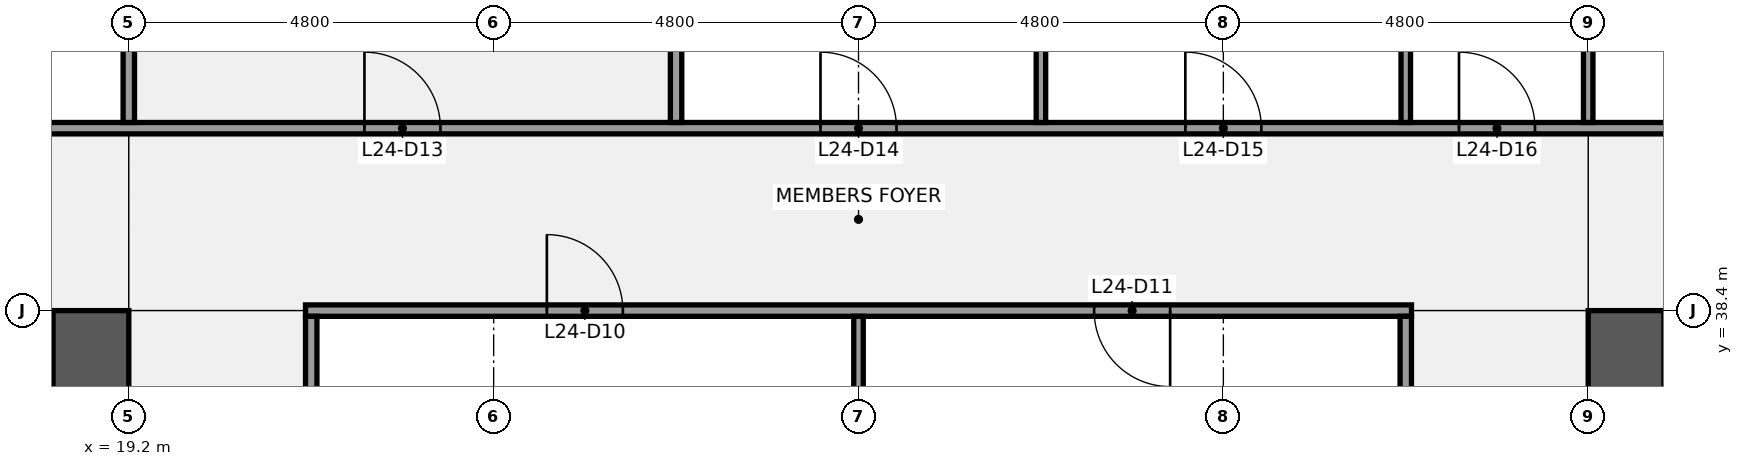
"""IFC4 building model, lengths in metres.
Left out: names, types, materials, properties, quantities, classifications, styles, units other than length and angle.
Written with IfcOpenShell. Run it as: python <this file> out.ifc"""

import sys

from ifc_helpers import new_model, si_unit, direction, frame, frame_2d, origin, place, context, subcontext, project, spatial, rectangle, extrude, element, fill, save


model = new_model("IFC4")
c1 = context("Model", 3, precision=1e-05, world=origin(), true_north=direction((0.0, 1.0)))
c2 = subcontext(c1, "Body", "Model", "MODEL_VIEW")
j1 = project(units=[si_unit("LENGTHUNIT", "METRE"), si_unit("PLANEANGLEUNIT", "RADIAN")], contexts=[c1])
p1 = place(None, origin())
s1 = spatial("IfcSite", under=j1, at=p1, CompositionType="ELEMENT")
p2 = place(p1, origin())
s2 = spatial("IfcBuilding", under=s1, at=p2, CompositionType="ELEMENT")
p3 = place(p2, frame((0.0, 0.0, 116.1)))
s3 = spatial("IfcBuildingStorey", under=s2, at=p3, CompositionType="ELEMENT", Elevation=116.1)
p4 = place(p3, frame((18.7, 38.4, 0.0), z_axis=(0.0, 0.0, 1.0), x_axis=(0.0, -1.0, 0.0)))
e1 = element("IfcWall", 1, at=p4, inside=s3, PredefinedType="SHEAR", context=c2, shape_type="SweptSolid", body=[
    extrude(rectangle(XDim=28.8, YDim=1.0, at=frame_2d((14.4, 0.0))), origin(), (0.0, 0.0, 1.0), 3.84),
])
p5 = place(p4, frame((18.3, 0.0, 0.0)))
e2 = element("IfcOpeningElement", 2, at=p5, cuts=e1, PredefinedType="OPENING", context=c2, shape_type="SweptSolid", body=[
    extrude(rectangle(XDim=1.8, YDim=2.1, at=frame_2d((0.9, 1.05))), frame((0.0, 0.51, 0.0), z_axis=(0.0, -1.0, 0.0), x_axis=(1.0, 0.0, 0.0)), (0.0, 0.0, 1.0), 1.02),
])
p6 = place(p4, frame((8.7, 0.0, 0.0)))
e3 = element("IfcOpeningElement", 3, at=p6, cuts=e1, PredefinedType="OPENING", context=c2, shape_type="SweptSolid", body=[
    extrude(rectangle(XDim=1.8, YDim=2.1, at=frame_2d((0.9, 1.05))), frame((0.0, 0.51, 0.0), z_axis=(0.0, -1.0, 0.0), x_axis=(1.0, 0.0, 0.0)), (0.0, 0.0, 1.0), 1.02),
])
p7 = place(p3, frame((38.9, 9.6, 0.0), z_axis=(0.0, 0.0, 1.0), x_axis=(0.0, 1.0, 0.0)))
e4 = element("IfcWall", 4, at=p7, inside=s3, PredefinedType="SHEAR", context=c2, shape_type="SweptSolid", body=[
    extrude(rectangle(XDim=28.8, YDim=1.0, at=frame_2d((14.4, 0.0))), origin(), (0.0, 0.0, 1.0), 3.84),
])
p8 = place(p7, frame((8.7, 0.0, 0.0)))
e5 = element("IfcOpeningElement", 5, at=p8, cuts=e4, PredefinedType="OPENING", context=c2, shape_type="SweptSolid", body=[
    extrude(rectangle(XDim=1.8, YDim=2.1, at=frame_2d((0.9, 1.05))), frame((0.0, 0.51, 0.0), z_axis=(0.0, -1.0, 0.0), x_axis=(1.0, 0.0, 0.0)), (0.0, 0.0, 1.0), 1.02),
])
p9 = place(p7, frame((18.3, 0.0, 0.0)))
e6 = element("IfcOpeningElement", 6, at=p9, cuts=e4, PredefinedType="OPENING", context=c2, shape_type="SweptSolid", body=[
    extrude(rectangle(XDim=1.8, YDim=2.1, at=frame_2d((0.9, 1.05))), frame((0.0, 0.51, 0.0), z_axis=(0.0, -1.0, 0.0), x_axis=(1.0, 0.0, 0.0)), (0.0, 0.0, 1.0), 1.02),
])
p10 = place(p3, frame((21.525, 38.4, 0.0), z_axis=(0.0, 0.0, 1.0), x_axis=(1.0, 0.0, 0.0)))
e7 = element("IfcWall", 7, at=p10, inside=s3, PredefinedType="PARTITIONING", context=c2, shape_type="SweptSolid", body=[
    extrude(rectangle(XDim=14.55, YDim=0.15, at=frame_2d((7.275, 0.0))), origin(), (0.0, 0.0, 1.0), 2.936),
])
p11 = place(p10, frame((3.175, 0.0, 0.0)))
e8 = element("IfcOpeningElement", 8, at=p11, cuts=e7, PredefinedType="OPENING", context=c2, shape_type="SweptSolid", body=[
    extrude(rectangle(XDim=1.0, YDim=2.1, at=frame_2d((0.5, 1.05))), frame((0.0, 0.085, 0.0), z_axis=(0.0, -1.0, 0.0), x_axis=(1.0, 0.0, 0.0)), (0.0, 0.0, 1.0), 0.17),
])
p12 = place(p10, frame((10.375, 0.0, 0.0)))
e9 = element("IfcOpeningElement", 9, at=p12, cuts=e7, PredefinedType="OPENING", context=c2, shape_type="SweptSolid", body=[
    extrude(rectangle(XDim=1.0, YDim=2.1, at=frame_2d((0.5, 1.05))), frame((0.0, 0.085, 0.0), z_axis=(0.0, -1.0, 0.0), x_axis=(1.0, 0.0, 0.0)), (0.0, 0.0, 1.0), 0.17),
])
p13 = place(p3, frame((14.325, 40.8, 0.0), z_axis=(0.0, 0.0, 1.0), x_axis=(1.0, 0.0, 0.0)))
e10 = element("IfcWall", 10, at=p13, inside=s3, PredefinedType="PARTITIONING", context=c2, shape_type="SweptSolid", body=[
    extrude(rectangle(XDim=28.95, YDim=0.15, at=frame_2d((14.475, 0.0))), origin(), (0.0, 0.0, 1.0), 2.936),
])
p14 = place(p13, frame((2.575, 0.0, 0.0)))
e11 = element("IfcOpeningElement", 11, at=p14, cuts=e10, PredefinedType="OPENING", context=c2, shape_type="SweptSolid", body=[
    extrude(rectangle(XDim=1.0, YDim=2.1, at=frame_2d((0.5, 1.05))), frame((0.0, 0.085, 0.0), z_axis=(0.0, -1.0, 0.0), x_axis=(1.0, 0.0, 0.0)), (0.0, 0.0, 1.0), 0.17),
])
p15 = place(p13, frame((7.975, 0.0, 0.0)))
e12 = element("IfcOpeningElement", 12, at=p15, cuts=e10, PredefinedType="OPENING", context=c2, shape_type="SweptSolid", body=[
    extrude(rectangle(XDim=1.0, YDim=2.1, at=frame_2d((0.5, 1.05))), frame((0.0, 0.085, 0.0), z_axis=(0.0, -1.0, 0.0), x_axis=(1.0, 0.0, 0.0)), (0.0, 0.0, 1.0), 0.17),
])
p16 = place(p13, frame((13.975, 0.0, 0.0)))
e13 = element("IfcOpeningElement", 13, at=p16, cuts=e10, PredefinedType="OPENING", context=c2, shape_type="SweptSolid", body=[
    extrude(rectangle(XDim=1.0, YDim=2.1, at=frame_2d((0.5, 1.05))), frame((0.0, 0.085, 0.0), z_axis=(0.0, -1.0, 0.0), x_axis=(1.0, 0.0, 0.0)), (0.0, 0.0, 1.0), 0.17),
])
p17 = place(p13, frame((18.775, 0.0, 0.0)))
e14 = element("IfcOpeningElement", 14, at=p17, cuts=e10, PredefinedType="OPENING", context=c2, shape_type="SweptSolid", body=[
    extrude(rectangle(XDim=1.0, YDim=2.1, at=frame_2d((0.5, 1.05))), frame((0.0, 0.085, 0.0), z_axis=(0.0, -1.0, 0.0), x_axis=(1.0, 0.0, 0.0)), (0.0, 0.0, 1.0), 0.17),
])
p18 = place(p13, frame((22.375, 0.0, 0.0)))
e15 = element("IfcOpeningElement", 15, at=p18, cuts=e10, PredefinedType="OPENING", context=c2, shape_type="SweptSolid", body=[
    extrude(rectangle(XDim=1.0, YDim=2.1, at=frame_2d((0.5, 1.05))), frame((0.0, 0.085, 0.0), z_axis=(0.0, -1.0, 0.0), x_axis=(1.0, 0.0, 0.0)), (0.0, 0.0, 1.0), 0.17),
])
p19 = place(p13, frame((25.975, 0.0, 0.0)))
e16 = element("IfcOpeningElement", 16, at=p19, cuts=e10, PredefinedType="OPENING", context=c2, shape_type="SweptSolid", body=[
    extrude(rectangle(XDim=1.0, YDim=2.1, at=frame_2d((0.5, 1.05))), frame((0.0, 0.085, 0.0), z_axis=(0.0, -1.0, 0.0), x_axis=(1.0, 0.0, 0.0)), (0.0, 0.0, 1.0), 0.17),
])
p20 = place(p3, frame((19.2, 40.875, 0.0), z_axis=(0.0, 0.0, 1.0), x_axis=(0.0, 1.0, 0.0)))
e17 = element("IfcWall", 17, at=p20, inside=s3, PredefinedType="PARTITIONING", context=c2, shape_type="SweptSolid", body=[
    extrude(rectangle(XDim=3.45, YDim=0.15, at=frame_2d((1.725, 0.0))), origin(), (0.0, 0.0, 1.0), 2.936),
])
p21 = place(p3, frame((21.6, 33.675, 0.0), z_axis=(0.0, 0.0, 1.0), x_axis=(0.0, 1.0, 0.0)))
e18 = element("IfcWall", 18, at=p21, inside=s3, PredefinedType="PARTITIONING", context=c2, shape_type="SweptSolid", body=[
    extrude(rectangle(XDim=4.65, YDim=0.15, at=frame_2d((2.325, 0.0))), origin(), (0.0, 0.0, 1.0), 2.936),
])
p22 = place(p3, frame((26.4, 40.875, 0.0), z_axis=(0.0, 0.0, 1.0), x_axis=(0.0, 1.0, 0.0)))
e19 = element("IfcWall", 19, at=p22, inside=s3, PredefinedType="PARTITIONING", context=c2, shape_type="SweptSolid", body=[
    extrude(rectangle(XDim=3.45, YDim=0.15, at=frame_2d((1.725, 0.0))), origin(), (0.0, 0.0, 1.0), 2.936),
])
p23 = place(p3, frame((28.8, 33.663, 0.0), z_axis=(0.0, 0.0, 1.0), x_axis=(0.0, 1.0, 0.0)))
e20 = element("IfcWall", 20, at=p23, inside=s3, PredefinedType="PARTITIONING", context=c2, shape_type="SweptSolid", body=[
    extrude(rectangle(XDim=4.662, YDim=0.125, at=frame_2d((2.331, 0.0))), origin(), (0.0, 0.0, 1.0), 2.936),
])
for number, where, z_axis, x_axis in (
    (21, (31.2, 40.875, 0.0), (0.0, 0.0, 1.0), (0.0, 1.0, 0.0)),
    (22, (36.0, 40.875, 0.0), (0.0, 0.0, 1.0), (0.0, 1.0, 0.0)),
):
    element("IfcWall", number, at=place(p3, frame(where, z_axis=z_axis, x_axis=x_axis)), inside=s3, PredefinedType="PARTITIONING", context=c2, shape_type="SweptSolid", body=[
        extrude(rectangle(XDim=7.025, YDim=0.125, at=frame_2d((3.512, 0.0))), origin(), (0.0, 0.0, 1.0), 2.936),
    ])
p24 = place(p3, frame((36.0, 33.675, 0.0), z_axis=(0.0, 0.0, 1.0), x_axis=(0.0, 1.0, 0.0)))
e23 = element("IfcWall", 23, at=p24, inside=s3, PredefinedType="PARTITIONING", context=c2, shape_type="SweptSolid", body=[
    extrude(rectangle(XDim=4.65, YDim=0.15, at=frame_2d((2.325, 0.0))), origin(), (0.0, 0.0, 1.0), 2.936),
])
p25 = place(p3, frame((38.4, 40.875, 0.0), z_axis=(0.0, 0.0, 1.0), x_axis=(0.0, 1.0, 0.0)))
e24 = element("IfcWall", 24, at=p25, inside=s3, PredefinedType="PARTITIONING", context=c2, shape_type="SweptSolid", body=[
    extrude(rectangle(XDim=6.525, YDim=0.125, at=frame_2d((3.262, 0.0))), origin(), (0.0, 0.0, 1.0), 2.936),
])
p26 = place(p11, origin())
e25 = element("IfcDoor", 25, at=p26, inside=s3, OperationType="SINGLE_SWING_LEFT", PredefinedType="DOOR", context=c2, shape_type="SweptSolid", body=[
    extrude(rectangle(XDim=1.0, YDim=2.1, at=frame_2d((0.5, 1.05))), frame((0.0, 0.025, 0.0), z_axis=(0.0, -1.0, 0.0), x_axis=(1.0, 0.0, 0.0)), (0.0, 0.0, 1.0), 0.05),
])
fill(e8, e25)
p27 = place(p12, origin())
e26 = element("IfcDoor", 26, at=p27, inside=s3, OperationType="SINGLE_SWING_RIGHT", PredefinedType="DOOR", context=c2, shape_type="SweptSolid", body=[
    extrude(rectangle(XDim=1.0, YDim=2.1, at=frame_2d((0.5, 1.05))), frame((0.0, 0.025, 0.0), z_axis=(0.0, -1.0, 0.0), x_axis=(1.0, 0.0, 0.0)), (0.0, 0.0, 1.0), 0.05),
])
fill(e9, e26)
p28 = place(p15, origin())
e27 = element("IfcDoor", 27, at=p28, inside=s3, OperationType="SINGLE_SWING_LEFT", PredefinedType="DOOR", context=c2, shape_type="SweptSolid", body=[
    extrude(rectangle(XDim=1.0, YDim=2.1, at=frame_2d((0.5, 1.05))), frame((0.0, 0.025, 0.0), z_axis=(0.0, -1.0, 0.0), x_axis=(1.0, 0.0, 0.0)), (0.0, 0.0, 1.0), 0.05),
])
fill(e12, e27)
p29 = place(p16, origin())
e28 = element("IfcDoor", 28, at=p29, inside=s3, OperationType="SINGLE_SWING_LEFT", PredefinedType="DOOR", context=c2, shape_type="SweptSolid", body=[
    extrude(rectangle(XDim=1.0, YDim=2.1, at=frame_2d((0.5, 1.05))), frame((0.0, 0.025, 0.0), z_axis=(0.0, -1.0, 0.0), x_axis=(1.0, 0.0, 0.0)), (0.0, 0.0, 1.0), 0.05),
])
fill(e13, e28)
p30 = place(p17, origin())
e29 = element("IfcDoor", 29, at=p30, inside=s3, OperationType="SINGLE_SWING_LEFT", PredefinedType="DOOR", context=c2, shape_type="SweptSolid", body=[
    extrude(rectangle(XDim=1.0, YDim=2.1, at=frame_2d((0.5, 1.05))), frame((0.0, 0.025, 0.0), z_axis=(0.0, -1.0, 0.0), x_axis=(1.0, 0.0, 0.0)), (0.0, 0.0, 1.0), 0.05),
])
fill(e14, e29)
p31 = place(p18, origin())
e30 = element("IfcDoor", 30, at=p31, inside=s3, OperationType="SINGLE_SWING_LEFT", PredefinedType="DOOR", context=c2, shape_type="SweptSolid", body=[
    extrude(rectangle(XDim=1.0, YDim=2.1, at=frame_2d((0.5, 1.05))), frame((0.0, 0.025, 0.0), z_axis=(0.0, -1.0, 0.0), x_axis=(1.0, 0.0, 0.0)), (0.0, 0.0, 1.0), 0.05),
])
fill(e15, e30)
save(model, sys.argv[1])
